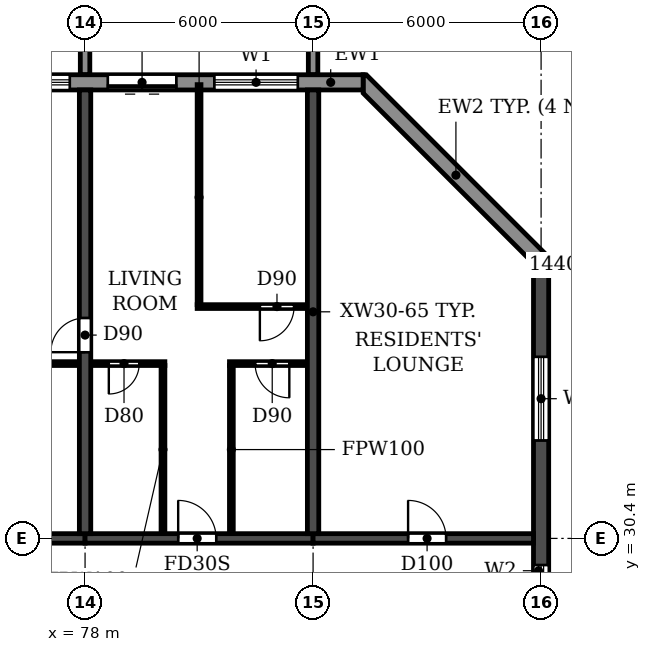
"""IFC4 building model, lengths in metres.
Left out: names, types, materials, properties, quantities, classifications, styles, units other than length and angle.
Written with IfcOpenShell. Run it as: python <this file> out.ifc"""

import sys

from ifc_helpers import new_model, si_unit, direction, frame, frame_2d, origin, place, context, subcontext, project, spatial, polyline, rectangle, outline, extrude, source, transform, mapped, element, fill, save


model = new_model("IFC4")
c1 = context("Model", 3, precision=1e-05, world=origin(), true_north=direction((0.0, 1.0)))
c2 = subcontext(c1, "Body", "Model", "MODEL_VIEW")
j1 = project(units=[si_unit("LENGTHUNIT", "METRE"), si_unit("PLANEANGLEUNIT", "RADIAN")], contexts=[c1])
p1 = place(None, origin())
s1 = spatial("IfcSite", under=j1, at=p1, CompositionType="ELEMENT")
p2 = place(p1, origin())
s2 = spatial("IfcBuilding", under=s1, at=p2, CompositionType="ELEMENT")
p3 = place(p2, frame((0.0, 0.0, 122.4)))
s3 = spatial("IfcBuildingStorey", under=s2, at=p3, CompositionType="ELEMENT", Elevation=122.4)
p4 = place(p3, frame((78.0, 30.525, 0.0), z_axis=(0.0, 0.0, 1.0), x_axis=(0.0, 1.0, 0.0)))
e1 = element("IfcWall", 1, at=p4, inside=s3, PredefinedType="SHEAR", context=c2, shape_type="SweptSolid", body=[
    extrude(rectangle(XDim=11.675, YDim=0.3, at=frame_2d((5.837, 0.0))), origin(), (0.0, 0.0, 1.0), 3.07),
])
p5 = place(p4, frame((4.775, 0.0, 0.0)))
e2 = element("IfcOpeningElement", 2, at=p5, cuts=e1, PredefinedType="OPENING", context=c2, shape_type="SweptSolid", body=[
    extrude(rectangle(XDim=0.9, YDim=2.1, at=frame_2d((0.45, 1.05))), frame((0.0, 0.16, 0.0), z_axis=(0.0, -1.0, 0.0), x_axis=(1.0, 0.0, 0.0)), (0.0, 0.0, 1.0), 0.32),
])
p6 = place(p3, frame((84.0, 30.525, 0.0), z_axis=(0.0, 0.0, 1.0), x_axis=(0.0, 1.0, 0.0)))
e3 = element("IfcWall", 3, at=p6, inside=s3, PredefinedType="SHEAR", context=c2, shape_type="SweptSolid", body=[
    extrude(rectangle(XDim=11.675, YDim=0.3, at=frame_2d((5.837, 0.0))), origin(), (0.0, 0.0, 1.0), 3.07),
])
p7 = place(p3, frame((90.0, 4.683, 0.0), z_axis=(0.0, 0.0, 1.0), x_axis=(0.0, 1.0, 0.0)))
e4 = element("IfcWall", 4, at=p7, inside=s3, PredefinedType="SHEAR", context=c2, shape_type="SweptSolid", body=[
    extrude(rectangle(XDim=33.034, YDim=0.4, at=frame_2d((16.517, 0.0))), origin(), (0.0, 0.0, 1.0), 3.07),
])
p8 = place(p7, frame((23.817, 0.0, 0.9)))
e5 = element("IfcOpeningElement", 5, at=p8, cuts=e4, PredefinedType="OPENING", context=c2, shape_type="SweptSolid", body=[
    extrude(rectangle(XDim=1.2, YDim=1.5, at=frame_2d((0.6, 0.75))), frame((0.0, 0.21, 0.0), z_axis=(0.0, -1.0, 0.0), x_axis=(1.0, 0.0, 0.0)), (0.0, 0.0, 1.0), 0.42),
])
p9 = place(p7, frame((8.017, 0.0, 0.9)))
e6 = element("IfcOpeningElement", 6, at=p9, cuts=e4, PredefinedType="OPENING", context=c2, shape_type="SweptSolid", body=[
    extrude(rectangle(XDim=1.2, YDim=1.5, at=frame_2d((0.6, 0.75))), frame((0.0, 0.21, 0.0), z_axis=(0.0, -1.0, 0.0), x_axis=(1.0, 0.0, 0.0)), (0.0, 0.0, 1.0), 0.42),
])
p10 = place(p7, frame((28.293, 0.0, 0.6)))
e7 = element("IfcOpeningElement", 7, at=p10, cuts=e4, PredefinedType="OPENING", context=c2, shape_type="SweptSolid", body=[
    extrude(rectangle(XDim=2.2, YDim=1.8, at=frame_2d((1.1, 0.9))), frame((0.0, 0.21, 0.0), z_axis=(0.0, -1.0, 0.0), x_axis=(1.0, 0.0, 0.0)), (0.0, 0.0, 1.0), 0.42),
])
p11 = place(p7, frame((2.541, 0.0, 0.6)))
e8 = element("IfcOpeningElement", 8, at=p11, cuts=e4, PredefinedType="OPENING", context=c2, shape_type="SweptSolid", body=[
    extrude(rectangle(XDim=2.2, YDim=1.8, at=frame_2d((1.1, 0.9))), frame((0.0, 0.21, 0.0), z_axis=(0.0, -1.0, 0.0), x_axis=(1.0, 0.0, 0.0)), (0.0, 0.0, 1.0), 0.42),
])
p12 = place(p3, frame((72.0, 30.4, 0.0), z_axis=(0.0, 0.0, 1.0), x_axis=(1.0, 0.0, 0.0)))
e9 = element("IfcWall", 9, at=p12, inside=s3, PredefinedType="SHEAR", context=c2, shape_type="SweptSolid", body=[
    extrude(rectangle(XDim=6.0, YDim=0.25, at=frame_2d((3.0, 0.0))), origin(), (0.0, 0.0, 1.0), 2.47),
])
p13 = place(p3, frame((78.0, 30.4, 0.0), z_axis=(0.0, 0.0, 1.0), x_axis=(1.0, 0.0, 0.0)))
e10 = element("IfcWall", 10, at=p13, inside=s3, PredefinedType="SHEAR", context=c2, shape_type="SweptSolid", body=[
    extrude(rectangle(XDim=6.0, YDim=0.25, at=frame_2d((3.0, 0.0))), origin(), (0.0, 0.0, 1.0), 2.47),
])
p14 = place(p13, frame((2.45, 0.0, 0.0)))
e11 = element("IfcOpeningElement", 11, at=p14, cuts=e10, PredefinedType="OPENING", context=c2, shape_type="SweptSolid", body=[
    extrude(rectangle(XDim=1.0, YDim=2.1, at=frame_2d((0.5, 1.05))), frame((0.0, 0.135, 0.0), z_axis=(0.0, -1.0, 0.0), x_axis=(1.0, 0.0, 0.0)), (0.0, 0.0, 1.0), 0.27),
])
p15 = place(p3, frame((84.0, 30.4, 0.0), z_axis=(0.0, 0.0, 1.0), x_axis=(1.0, 0.0, 0.0)))
e12 = element("IfcWall", 12, at=p15, inside=s3, PredefinedType="SHEAR", context=c2, shape_type="SweptSolid", body=[
    extrude(rectangle(XDim=5.8, YDim=0.25, at=frame_2d((2.9, 0.0))), origin(), (0.0, 0.0, 1.0), 2.47),
])
p16 = place(p15, frame((2.5, 0.0, 0.0)))
e13 = element("IfcOpeningElement", 13, at=p16, cuts=e12, PredefinedType="OPENING", context=c2, shape_type="SweptSolid", body=[
    extrude(rectangle(XDim=1.0, YDim=2.1, at=frame_2d((0.5, 1.05))), frame((0.0, 0.135, 0.0), z_axis=(0.0, -1.0, 0.0), x_axis=(1.0, 0.0, 0.0)), (0.0, 0.0, 1.0), 0.27),
])
p17 = place(p3, origin())
e14 = element("IfcWall", 14, at=p17, inside=s3, PredefinedType="STANDARD", context=c2, shape_type="SweptSolid", body=[
    extrude(outline(polyline([(90.2, 37.717), (90.2, 37.8), (85.4, 42.6), (85.317, 42.6), (85.317, 42.117), (89.717, 37.717), (90.2, 37.717)])), origin(), (0.0, 0.0, 1.0), 3.07),
])
p18 = place(p3, frame((85.317, 42.4, 0.0), z_axis=(0.0, 0.0, 1.0), x_axis=(-1.0, 0.0, 0.0)))
e15 = element("IfcWall", 15, at=p18, inside=s3, PredefinedType="STANDARD", context=c2, shape_type="SweptSolid", body=[
    extrude(rectangle(XDim=68.634, YDim=0.4, at=frame_2d((34.317, 0.0))), origin(), (0.0, 0.0, 1.0), 3.07),
])
p19 = place(p18, frame((64.717, 0.0, 0.9)))
e16 = element("IfcOpeningElement", 16, at=p19, cuts=e15, PredefinedType="OPENING", context=c2, shape_type="SweptSolid", body=[
    extrude(rectangle(XDim=2.2, YDim=1.5, at=frame_2d((1.1, 0.75))), frame((0.0, 0.21, 0.0), z_axis=(0.0, -1.0, 0.0), x_axis=(1.0, 0.0, 0.0)), (0.0, 0.0, 1.0), 0.42),
])
p20 = place(p18, frame((61.917, 0.0, 0.0)))
e17 = element("IfcOpeningElement", 17, at=p20, cuts=e15, PredefinedType="OPENING", context=c2, shape_type="SweptSolid", body=[
    extrude(rectangle(XDim=1.8, YDim=2.4, at=frame_2d((0.9, 1.2))), frame((0.0, 0.21, 0.0), z_axis=(0.0, -1.0, 0.0), x_axis=(1.0, 0.0, 0.0)), (0.0, 0.0, 1.0), 0.42),
])
p21 = place(p18, frame((58.717, 0.0, 0.9)))
e18 = element("IfcOpeningElement", 18, at=p21, cuts=e15, PredefinedType="OPENING", context=c2, shape_type="SweptSolid", body=[
    extrude(rectangle(XDim=2.2, YDim=1.5, at=frame_2d((1.1, 0.75))), frame((0.0, 0.21, 0.0), z_axis=(0.0, -1.0, 0.0), x_axis=(1.0, 0.0, 0.0)), (0.0, 0.0, 1.0), 0.42),
])
p22 = place(p18, frame((55.917, 0.0, 0.0)))
e19 = element("IfcOpeningElement", 19, at=p22, cuts=e15, PredefinedType="OPENING", context=c2, shape_type="SweptSolid", body=[
    extrude(rectangle(XDim=1.8, YDim=2.4, at=frame_2d((0.9, 1.2))), frame((0.0, 0.21, 0.0), z_axis=(0.0, -1.0, 0.0), x_axis=(1.0, 0.0, 0.0)), (0.0, 0.0, 1.0), 0.42),
])
p23 = place(p18, frame((52.717, 0.0, 0.9)))
e20 = element("IfcOpeningElement", 20, at=p23, cuts=e15, PredefinedType="OPENING", context=c2, shape_type="SweptSolid", body=[
    extrude(rectangle(XDim=2.2, YDim=1.5, at=frame_2d((1.1, 0.75))), frame((0.0, 0.21, 0.0), z_axis=(0.0, -1.0, 0.0), x_axis=(1.0, 0.0, 0.0)), (0.0, 0.0, 1.0), 0.42),
])
p24 = place(p18, frame((49.917, 0.0, 0.0)))
e21 = element("IfcOpeningElement", 21, at=p24, cuts=e15, PredefinedType="OPENING", context=c2, shape_type="SweptSolid", body=[
    extrude(rectangle(XDim=1.8, YDim=2.4, at=frame_2d((0.9, 1.2))), frame((0.0, 0.21, 0.0), z_axis=(0.0, -1.0, 0.0), x_axis=(1.0, 0.0, 0.0)), (0.0, 0.0, 1.0), 0.42),
])
p25 = place(p18, frame((46.717, 0.0, 0.9)))
e22 = element("IfcOpeningElement", 22, at=p25, cuts=e15, PredefinedType="OPENING", context=c2, shape_type="SweptSolid", body=[
    extrude(rectangle(XDim=2.2, YDim=1.5, at=frame_2d((1.1, 0.75))), frame((0.0, 0.21, 0.0), z_axis=(0.0, -1.0, 0.0), x_axis=(1.0, 0.0, 0.0)), (0.0, 0.0, 1.0), 0.42),
])
p26 = place(p18, frame((43.917, 0.0, 0.0)))
e23 = element("IfcOpeningElement", 23, at=p26, cuts=e15, PredefinedType="OPENING", context=c2, shape_type="SweptSolid", body=[
    extrude(rectangle(XDim=1.8, YDim=2.4, at=frame_2d((0.9, 1.2))), frame((0.0, 0.21, 0.0), z_axis=(0.0, -1.0, 0.0), x_axis=(1.0, 0.0, 0.0)), (0.0, 0.0, 1.0), 0.42),
])
p27 = place(p18, frame((40.717, 0.0, 0.9)))
e24 = element("IfcOpeningElement", 24, at=p27, cuts=e15, PredefinedType="OPENING", context=c2, shape_type="SweptSolid", body=[
    extrude(rectangle(XDim=2.2, YDim=1.5, at=frame_2d((1.1, 0.75))), frame((0.0, 0.21, 0.0), z_axis=(0.0, -1.0, 0.0), x_axis=(1.0, 0.0, 0.0)), (0.0, 0.0, 1.0), 0.42),
])
p28 = place(p18, frame((37.717, 0.0, 0.9)))
e25 = element("IfcOpeningElement", 25, at=p28, cuts=e15, PredefinedType="OPENING", context=c2, shape_type="SweptSolid", body=[
    extrude(rectangle(XDim=2.2, YDim=1.5, at=frame_2d((1.1, 0.75))), frame((0.0, 0.21, 0.0), z_axis=(0.0, -1.0, 0.0), x_axis=(1.0, 0.0, 0.0)), (0.0, 0.0, 1.0), 0.42),
])
p29 = place(p18, frame((34.917, 0.0, 0.0)))
e26 = element("IfcOpeningElement", 26, at=p29, cuts=e15, PredefinedType="OPENING", context=c2, shape_type="SweptSolid", body=[
    extrude(rectangle(XDim=1.8, YDim=2.4, at=frame_2d((0.9, 1.2))), frame((0.0, 0.21, 0.0), z_axis=(0.0, -1.0, 0.0), x_axis=(1.0, 0.0, 0.0)), (0.0, 0.0, 1.0), 0.42),
])
p30 = place(p18, frame((31.717, 0.0, 0.9)))
e27 = element("IfcOpeningElement", 27, at=p30, cuts=e15, PredefinedType="OPENING", context=c2, shape_type="SweptSolid", body=[
    extrude(rectangle(XDim=2.2, YDim=1.5, at=frame_2d((1.1, 0.75))), frame((0.0, 0.21, 0.0), z_axis=(0.0, -1.0, 0.0), x_axis=(1.0, 0.0, 0.0)), (0.0, 0.0, 1.0), 0.42),
])
p31 = place(p18, frame((28.717, 0.0, 0.9)))
e28 = element("IfcOpeningElement", 28, at=p31, cuts=e15, PredefinedType="OPENING", context=c2, shape_type="SweptSolid", body=[
    extrude(rectangle(XDim=2.2, YDim=1.5, at=frame_2d((1.1, 0.75))), frame((0.0, 0.21, 0.0), z_axis=(0.0, -1.0, 0.0), x_axis=(1.0, 0.0, 0.0)), (0.0, 0.0, 1.0), 0.42),
])
p32 = place(p18, frame((25.717, 0.0, 0.9)))
e29 = element("IfcOpeningElement", 29, at=p32, cuts=e15, PredefinedType="OPENING", context=c2, shape_type="SweptSolid", body=[
    extrude(rectangle(XDim=2.2, YDim=1.5, at=frame_2d((1.1, 0.75))), frame((0.0, 0.21, 0.0), z_axis=(0.0, -1.0, 0.0), x_axis=(1.0, 0.0, 0.0)), (0.0, 0.0, 1.0), 0.42),
])
p33 = place(p18, frame((22.717, 0.0, 0.9)))
e30 = element("IfcOpeningElement", 30, at=p33, cuts=e15, PredefinedType="OPENING", context=c2, shape_type="SweptSolid", body=[
    extrude(rectangle(XDim=2.2, YDim=1.5, at=frame_2d((1.1, 0.75))), frame((0.0, 0.21, 0.0), z_axis=(0.0, -1.0, 0.0), x_axis=(1.0, 0.0, 0.0)), (0.0, 0.0, 1.0), 0.42),
])
p34 = place(p18, frame((19.917, 0.0, 0.0)))
e31 = element("IfcOpeningElement", 31, at=p34, cuts=e15, PredefinedType="OPENING", context=c2, shape_type="SweptSolid", body=[
    extrude(rectangle(XDim=1.8, YDim=2.4, at=frame_2d((0.9, 1.2))), frame((0.0, 0.21, 0.0), z_axis=(0.0, -1.0, 0.0), x_axis=(1.0, 0.0, 0.0)), (0.0, 0.0, 1.0), 0.42),
])
p35 = place(p18, frame((16.917, 0.0, 0.0)))
e32 = element("IfcOpeningElement", 32, at=p35, cuts=e15, PredefinedType="OPENING", context=c2, shape_type="SweptSolid", body=[
    extrude(rectangle(XDim=1.8, YDim=2.4, at=frame_2d((0.9, 1.2))), frame((0.0, 0.21, 0.0), z_axis=(0.0, -1.0, 0.0), x_axis=(1.0, 0.0, 0.0)), (0.0, 0.0, 1.0), 0.42),
])
p36 = place(p18, frame((13.717, 0.0, 0.9)))
e33 = element("IfcOpeningElement", 33, at=p36, cuts=e15, PredefinedType="OPENING", context=c2, shape_type="SweptSolid", body=[
    extrude(rectangle(XDim=2.2, YDim=1.5, at=frame_2d((1.1, 0.75))), frame((0.0, 0.21, 0.0), z_axis=(0.0, -1.0, 0.0), x_axis=(1.0, 0.0, 0.0)), (0.0, 0.0, 1.0), 0.42),
])
p37 = place(p18, frame((10.717, 0.0, 0.9)))
e34 = element("IfcOpeningElement", 34, at=p37, cuts=e15, PredefinedType="OPENING", context=c2, shape_type="SweptSolid", body=[
    extrude(rectangle(XDim=2.2, YDim=1.5, at=frame_2d((1.1, 0.75))), frame((0.0, 0.21, 0.0), z_axis=(0.0, -1.0, 0.0), x_axis=(1.0, 0.0, 0.0)), (0.0, 0.0, 1.0), 0.42),
])
p38 = place(p18, frame((7.717, 0.0, 0.9)))
e35 = element("IfcOpeningElement", 35, at=p38, cuts=e15, PredefinedType="OPENING", context=c2, shape_type="SweptSolid", body=[
    extrude(rectangle(XDim=2.2, YDim=1.5, at=frame_2d((1.1, 0.75))), frame((0.0, 0.21, 0.0), z_axis=(0.0, -1.0, 0.0), x_axis=(1.0, 0.0, 0.0)), (0.0, 0.0, 1.0), 0.42),
])
p39 = place(p18, frame((4.917, 0.0, 0.0)))
e36 = element("IfcOpeningElement", 36, at=p39, cuts=e15, PredefinedType="OPENING", context=c2, shape_type="SweptSolid", body=[
    extrude(rectangle(XDim=1.8, YDim=2.4, at=frame_2d((0.9, 1.2))), frame((0.0, 0.21, 0.0), z_axis=(0.0, -1.0, 0.0), x_axis=(1.0, 0.0, 0.0)), (0.0, 0.0, 1.0), 0.42),
])
p40 = place(p18, frame((1.717, 0.0, 0.9)))
e37 = element("IfcOpeningElement", 37, at=p40, cuts=e15, PredefinedType="OPENING", context=c2, shape_type="SweptSolid", body=[
    extrude(rectangle(XDim=2.2, YDim=1.5, at=frame_2d((1.1, 0.75))), frame((0.0, 0.21, 0.0), z_axis=(0.0, -1.0, 0.0), x_axis=(1.0, 0.0, 0.0)), (0.0, 0.0, 1.0), 0.42),
])
m1 = source(origin(), c2, "Body", "SweptSolid", [
    extrude(outline(polyline([(0.0, 0.0), (0.25, 0.0), (0.25, 3.1), (0.0, 3.1), (0.0, 0.0)])), origin(), (0.0, 0.0, 1.0), 3.1),
])
for number, where in (
    (38, (77.875, 42.6, 0.0)),
    (39, (83.875, 42.6, 0.0)),
):
    element("IfcWall", number, at=place(p3, frame(where)), inside=s3, PredefinedType="STANDARD", context=c2, shape_type="MappedRepresentation", body=[
        mapped(m1, transform((0.0, 0.0, 0.0))),
    ])
p41 = place(p3, frame((75.1, 35.0, 0.0), z_axis=(0.0, 0.0, 1.0), x_axis=(1.0, 0.0, 0.0)))
e40 = element("IfcWall", 40, at=p41, inside=s3, PredefinedType="PARTITIONING", context=c2, shape_type="SweptSolid", body=[
    extrude(rectangle(XDim=2.74, YDim=0.1, at=frame_2d((1.37, 0.0))), origin(), (0.0, 0.0, 1.0), 3.07),
])
p42 = place(p41, frame((1.0, 0.0, 0.0)))
e41 = element("IfcOpeningElement", 41, at=p42, cuts=e40, PredefinedType="OPENING", context=c2, shape_type="SweptSolid", body=[
    extrude(rectangle(XDim=0.8, YDim=2.1, at=frame_2d((0.4, 1.05))), frame((0.0, 0.06, 0.0), z_axis=(0.0, -1.0, 0.0), x_axis=(1.0, 0.0, 0.0)), (0.0, 0.0, 1.0), 0.12),
])
p43 = place(p3, frame((78.16, 35.0, 0.0), z_axis=(0.0, 0.0, 1.0), x_axis=(1.0, 0.0, 0.0)))
e42 = element("IfcWall", 42, at=p43, inside=s3, PredefinedType="PARTITIONING", context=c2, shape_type="SweptSolid", body=[
    extrude(rectangle(XDim=1.94, YDim=0.1, at=frame_2d((0.97, 0.0))), origin(), (0.0, 0.0, 1.0), 3.07),
])
p44 = place(p43, frame((0.465, 0.0, 0.0)))
e43 = element("IfcOpeningElement", 43, at=p44, cuts=e42, PredefinedType="OPENING", context=c2, shape_type="SweptSolid", body=[
    extrude(rectangle(XDim=0.8, YDim=2.1, at=frame_2d((0.4, 1.05))), frame((0.0, 0.06, 0.0), z_axis=(0.0, -1.0, 0.0), x_axis=(1.0, 0.0, 0.0)), (0.0, 0.0, 1.0), 0.12),
])
p45 = place(p3, frame((81.8, 35.0, 0.0), z_axis=(0.0, 0.0, 1.0), x_axis=(1.0, 0.0, 0.0)))
e44 = element("IfcWall", 44, at=p45, inside=s3, PredefinedType="PARTITIONING", context=c2, shape_type="SweptSolid", body=[
    extrude(rectangle(XDim=2.04, YDim=0.1, at=frame_2d((1.02, 0.0))), origin(), (0.0, 0.0, 1.0), 3.07),
])
p46 = place(p45, frame((0.675, 0.0, 0.0)))
e45 = element("IfcOpeningElement", 45, at=p46, cuts=e44, PredefinedType="OPENING", context=c2, shape_type="SweptSolid", body=[
    extrude(rectangle(XDim=0.9, YDim=2.1, at=frame_2d((0.45, 1.05))), frame((0.0, 0.06, 0.0), z_axis=(0.0, -1.0, 0.0), x_axis=(1.0, 0.0, 0.0)), (0.0, 0.0, 1.0), 0.12),
])
p47 = place(p3, frame((80.95, 36.5, 0.0), z_axis=(0.0, 0.0, 1.0), x_axis=(1.0, 0.0, 0.0)))
e46 = element("IfcWall", 46, at=p47, inside=s3, PredefinedType="PARTITIONING", context=c2, shape_type="SweptSolid", body=[
    extrude(rectangle(XDim=2.89, YDim=0.1, at=frame_2d((1.445, 0.0))), origin(), (0.0, 0.0, 1.0), 3.07),
])
p48 = place(p47, frame((1.65, 0.0, 0.0)))
e47 = element("IfcOpeningElement", 47, at=p48, cuts=e46, PredefinedType="OPENING", context=c2, shape_type="SweptSolid", body=[
    extrude(rectangle(XDim=0.9, YDim=2.1, at=frame_2d((0.45, 1.05))), frame((0.0, 0.06, 0.0), z_axis=(0.0, -1.0, 0.0), x_axis=(1.0, 0.0, 0.0)), (0.0, 0.0, 1.0), 0.12),
])
p49 = place(p3, frame((80.05, 30.535, 0.0), z_axis=(0.0, 0.0, 1.0), x_axis=(0.0, 1.0, 0.0)))
e48 = element("IfcWall", 48, at=p49, inside=s3, PredefinedType="PARTITIONING", context=c2, shape_type="SweptSolid", body=[
    extrude(rectangle(XDim=4.415, YDim=0.1, at=frame_2d((2.208, 0.0))), origin(), (0.0, 0.0, 1.0), 3.07),
])
p50 = place(p3, frame((81.0, 36.55, 0.0), z_axis=(0.0, 0.0, 1.0), x_axis=(0.0, 1.0, 0.0)))
e49 = element("IfcWall", 49, at=p50, inside=s3, PredefinedType="PARTITIONING", context=c2, shape_type="SweptSolid", body=[
    extrude(rectangle(XDim=5.79, YDim=0.1, at=frame_2d((2.895, 0.0))), origin(), (0.0, 0.0, 1.0), 3.07),
])
p51 = place(p3, frame((81.85, 30.535, 0.0), z_axis=(0.0, 0.0, 1.0), x_axis=(0.0, 1.0, 0.0)))
e50 = element("IfcWall", 50, at=p51, inside=s3, PredefinedType="PARTITIONING", context=c2, shape_type="SweptSolid", body=[
    extrude(rectangle(XDim=4.415, YDim=0.1, at=frame_2d((2.208, 0.0))), origin(), (0.0, 0.0, 1.0), 3.07),
])
p52 = place(p8, origin())
e51 = element("IfcWindow", 51, at=p52, inside=s3, PartitioningType="SINGLE_PANEL", PredefinedType="WINDOW", context=c2, shape_type="SweptSolid", body=[
    extrude(rectangle(XDim=1.2, YDim=1.5, at=frame_2d((0.6, 0.75))), frame((0.0, 0.03, 0.0), z_axis=(0.0, -1.0, 0.0), x_axis=(1.0, 0.0, 0.0)), (0.0, 0.0, 1.0), 0.06),
])
fill(e5, e51)
p53 = place(p10, origin())
e52 = element("IfcWindow", 52, at=p53, inside=s3, PartitioningType="DOUBLE_PANEL_HORIZONTAL", PredefinedType="WINDOW", context=c2, shape_type="SweptSolid", body=[
    extrude(rectangle(XDim=2.2, YDim=1.8, at=frame_2d((1.1, 0.9))), frame((0.0, 0.03, 0.0), z_axis=(0.0, -1.0, 0.0), x_axis=(1.0, 0.0, 0.0)), (0.0, 0.0, 1.0), 0.06),
])
fill(e7, e52)
p54 = place(p38, origin())
e53 = element("IfcWindow", 53, at=p54, inside=s3, PartitioningType="DOUBLE_PANEL_HORIZONTAL", PredefinedType="WINDOW", context=c2, shape_type="SweptSolid", body=[
    extrude(rectangle(XDim=2.2, YDim=1.5, at=frame_2d((1.1, 0.75))), frame((0.0, 0.03, 0.0), z_axis=(0.0, -1.0, 0.0), x_axis=(1.0, 0.0, 0.0)), (0.0, 0.0, 1.0), 0.06),
])
fill(e35, e53)
p55 = place(p39, origin())
e54 = element("IfcDoor", 54, at=p55, inside=s3, OperationType="DOUBLE_DOOR_SLIDING", PredefinedType="DOOR", context=c2, shape_type="SweptSolid", body=[
    extrude(rectangle(XDim=1.8, YDim=2.4, at=frame_2d((0.9, 1.2))), frame((0.0, 0.025, 0.0), z_axis=(0.0, -1.0, 0.0), x_axis=(1.0, 0.0, 0.0)), (0.0, 0.0, 1.0), 0.05),
])
fill(e36, e54)
p56 = place(p40, origin())
e55 = element("IfcWindow", 55, at=p56, inside=s3, PartitioningType="DOUBLE_PANEL_HORIZONTAL", PredefinedType="WINDOW", context=c2, shape_type="SweptSolid", body=[
    extrude(rectangle(XDim=2.2, YDim=1.5, at=frame_2d((1.1, 0.75))), frame((0.0, 0.03, 0.0), z_axis=(0.0, -1.0, 0.0), x_axis=(1.0, 0.0, 0.0)), (0.0, 0.0, 1.0), 0.06),
])
fill(e37, e55)
p57 = place(p5, origin())
e56 = element("IfcDoor", 56, at=p57, inside=s3, OperationType="SINGLE_SWING_LEFT", PredefinedType="DOOR", context=c2, shape_type="SweptSolid", body=[
    extrude(rectangle(XDim=0.9, YDim=2.1, at=frame_2d((0.45, 1.05))), frame((0.0, 0.025, 0.0), z_axis=(0.0, -1.0, 0.0), x_axis=(1.0, 0.0, 0.0)), (0.0, 0.0, 1.0), 0.05),
])
fill(e2, e56)
p58 = place(p44, frame((0.8, 0.0, 0.0), z_axis=(0.0, 0.0, 1.0), x_axis=(-1.0, 0.0, 0.0)))
e57 = element("IfcDoor", 57, at=p58, inside=s3, OperationType="SINGLE_SWING_RIGHT", PredefinedType="DOOR", context=c2, shape_type="SweptSolid", body=[
    extrude(rectangle(XDim=0.8, YDim=2.1, at=frame_2d((0.4, 1.05))), frame((0.0, 0.025, 0.0), z_axis=(0.0, -1.0, 0.0), x_axis=(1.0, 0.0, 0.0)), (0.0, 0.0, 1.0), 0.05),
])
fill(e43, e57)
p59 = place(p14, origin())
e58 = element("IfcDoor", 58, at=p59, inside=s3, OperationType="SINGLE_SWING_LEFT", PredefinedType="DOOR", context=c2, shape_type="SweptSolid", body=[
    extrude(rectangle(XDim=1.0, YDim=2.1, at=frame_2d((0.5, 1.05))), frame((0.0, 0.025, 0.0), z_axis=(0.0, -1.0, 0.0), x_axis=(1.0, 0.0, 0.0)), (0.0, 0.0, 1.0), 0.05),
])
fill(e11, e58)
p60 = place(p46, frame((0.9, 0.0, 0.0), z_axis=(0.0, 0.0, 1.0), x_axis=(-1.0, 0.0, 0.0)))
e59 = element("IfcDoor", 59, at=p60, inside=s3, OperationType="SINGLE_SWING_LEFT", PredefinedType="DOOR", context=c2, shape_type="SweptSolid", body=[
    extrude(rectangle(XDim=0.9, YDim=2.1, at=frame_2d((0.45, 1.05))), frame((0.0, 0.025, 0.0), z_axis=(0.0, -1.0, 0.0), x_axis=(1.0, 0.0, 0.0)), (0.0, 0.0, 1.0), 0.05),
])
fill(e45, e59)
p61 = place(p48, frame((0.9, 0.0, 0.0), z_axis=(0.0, 0.0, 1.0), x_axis=(-1.0, 0.0, 0.0)))
e60 = element("IfcDoor", 60, at=p61, inside=s3, OperationType="SINGLE_SWING_RIGHT", PredefinedType="DOOR", context=c2, shape_type="SweptSolid", body=[
    extrude(rectangle(XDim=0.9, YDim=2.1, at=frame_2d((0.45, 1.05))), frame((0.0, 0.025, 0.0), z_axis=(0.0, -1.0, 0.0), x_axis=(1.0, 0.0, 0.0)), (0.0, 0.0, 1.0), 0.05),
])
fill(e47, e60)
p62 = place(p16, origin())
e61 = element("IfcDoor", 61, at=p62, inside=s3, OperationType="SINGLE_SWING_LEFT", PredefinedType="DOOR", context=c2, shape_type="SweptSolid", body=[
    extrude(rectangle(XDim=1.0, YDim=2.1, at=frame_2d((0.5, 1.05))), frame((0.0, 0.025, 0.0), z_axis=(0.0, -1.0, 0.0), x_axis=(1.0, 0.0, 0.0)), (0.0, 0.0, 1.0), 0.05),
])
fill(e13, e61)
save(model, sys.argv[1])
